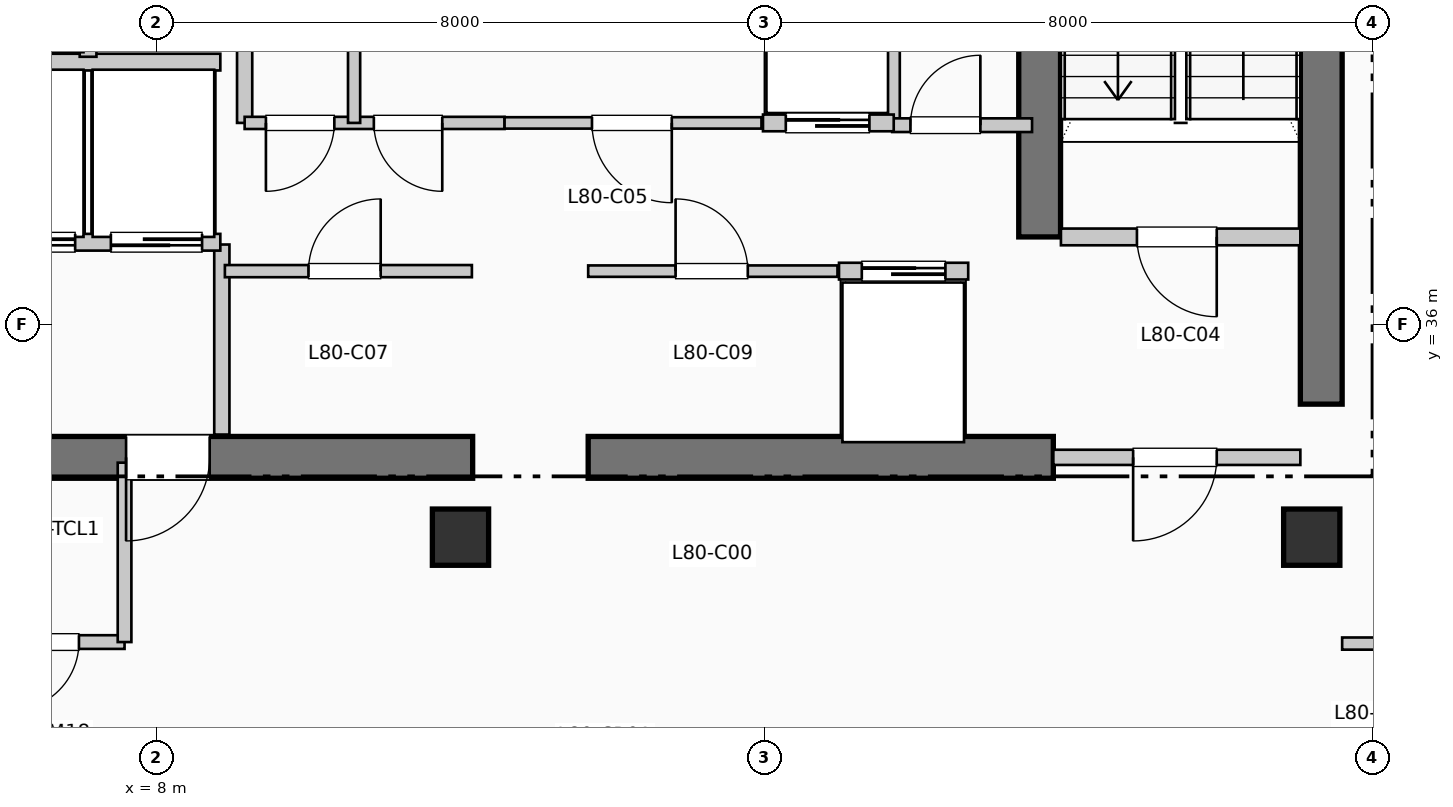
"""IFC4 building model, lengths in metres.
Left out: names, types, materials, properties, quantities, classifications, styles, units other than length and angle.
Written with IfcOpenShell. Run it as: python <this file> out.ifc"""

import sys

from ifc_helpers import new_model, si_unit, direction, frame, frame_2d, origin, origin_2d, place, context, subcontext, project, spatial, rectangle, extrude, element, fill, save


model = new_model("IFC4")
c1 = context("Model", 3, precision=1e-05, world=origin(), true_north=direction((0.0, 1.0)))
c2 = subcontext(c1, "Body", "Model", "MODEL_VIEW")
j1 = project(units=[si_unit("LENGTHUNIT", "METRE"), si_unit("PLANEANGLEUNIT", "RADIAN")], contexts=[c1])
p1 = place(None, origin())
s1 = spatial("IfcSite", under=j1, at=p1, CompositionType="ELEMENT")
p2 = place(p1, origin())
s2 = spatial("IfcBuilding", under=s1, at=p2, CompositionType="ELEMENT")
p3 = place(p2, frame((0.0, 0.0, 327.69)))
s3 = spatial("IfcBuildingStorey", under=s2, at=p3, CompositionType="ELEMENT", Elevation=327.69)
p4 = place(p3, frame((23.325, 34.95, 0.0), z_axis=(0.0, 0.0, 1.0), x_axis=(0.0, 1.0, 0.0)))
e1 = element("IfcWall", 1, at=p4, inside=s3, PredefinedType="SHEAR", context=c2, shape_type="SweptSolid", body=[
    extrude(rectangle(XDim=10.64, YDim=0.55, at=frame_2d((5.32, 0.0))), origin(), (0.0, 0.0, 1.0), 3.96),
])
p5 = place(p3, frame((1.45, 34.25, 0.0), z_axis=(0.0, 0.0, 1.0), x_axis=(1.0, 0.0, 0.0)))
e2 = element("IfcWall", 2, at=p5, inside=s3, PredefinedType="SHEAR", context=c2, shape_type="SweptSolid", body=[
    extrude(rectangle(XDim=10.71, YDim=0.55, at=frame_2d((5.355, 0.0))), origin(), (0.0, 0.0, 1.0), 3.96),
])
p6 = place(p5, frame((7.25, 0.0, 0.0), z_axis=(0.0, 0.0, 1.0), x_axis=(-1.0, 0.0, 0.0)))
e3 = element("IfcOpeningElement", 3, at=p6, cuts=e2, PredefinedType="OPENING", context=c2, shape_type="SweptSolid", body=[
    extrude(rectangle(XDim=1.1, YDim=2.15, at=frame_2d((0.55, 1.075))), frame((0.0, 0.285, 0.0), z_axis=(0.0, -1.0, 0.0), x_axis=(1.0, 0.0, 0.0)), (0.0, 0.0, 1.0), 0.57),
])
p7 = place(p3, frame((13.68, 34.25, 0.0), z_axis=(0.0, 0.0, 1.0), x_axis=(1.0, 0.0, 0.0)))
e4 = element("IfcWall", 4, at=p7, inside=s3, PredefinedType="SHEAR", context=c2, shape_type="SweptSolid", body=[
    extrude(rectangle(XDim=6.12, YDim=0.55, at=frame_2d((3.06, 0.0))), origin(), (0.0, 0.0, 1.0), 3.96),
])
p8 = place(p3, frame((19.62, 37.15, 0.0), z_axis=(0.0, 0.0, 1.0), x_axis=(0.0, 1.0, 0.0)))
e5 = element("IfcWall", 5, at=p8, inside=s3, PredefinedType="SHEAR", context=c2, shape_type="SweptSolid", body=[
    extrude(rectangle(XDim=7.89, YDim=0.55, at=frame_2d((3.945, 0.0))), origin(), (0.0, 0.0, 1.0), 3.96),
])
for number, where, z_axis, x_axis in (
    (6, (12.0, 33.2, 0.0), (0.0, 0.0, 1.0), (1.0, 0.0, 0.0)),
    (7, (23.2, 33.2, 0.0), (0.0, 0.0, 1.0), (1.0, 0.0, 0.0)),
):
    element("IfcColumn", number, at=place(p3, frame(where, z_axis=z_axis, x_axis=x_axis)), inside=s3, PredefinedType="COLUMN", context=c2, shape_type="SweptSolid", body=[
        extrude(rectangle(XDim=0.74, YDim=0.74, at=origin_2d()), origin(), (0.0, 0.0, 1.0), 3.96),
    ])
p9 = place(p3, frame((8.86, 34.55, 0.0), z_axis=(0.0, 0.0, 1.0), x_axis=(0.0, 1.0, 0.0)))
e8 = element("IfcWall", 8, at=p9, inside=s3, PredefinedType="PARTITIONING", context=c2, shape_type="SweptSolid", body=[
    extrude(rectangle(XDim=2.5, YDim=0.2, at=frame_2d((1.25, 0.0))), origin(), (0.0, 0.0, 1.0), 3.74),
])
p10 = place(p3, frame((19.9, 37.15, 0.0), z_axis=(0.0, 0.0, 1.0), x_axis=(1.0, 0.0, 0.0)))
e9 = element("IfcWall", 9, at=p10, inside=s3, PredefinedType="PARTITIONING", context=c2, shape_type="SweptSolid", body=[
    extrude(rectangle(XDim=3.15, YDim=0.22, at=frame_2d((1.575, 0.0))), origin(), (0.0, 0.0, 1.0), 3.74),
])
p11 = place(p10, frame((2.05, 0.0, 0.0), z_axis=(0.0, 0.0, 1.0), x_axis=(-1.0, 0.0, 0.0)))
e10 = element("IfcOpeningElement", 10, at=p11, cuts=e9, PredefinedType="OPENING", context=c2, shape_type="SweptSolid", body=[
    extrude(rectangle(XDim=1.05, YDim=2.15, at=frame_2d((0.525, 1.075))), frame((0.0, 0.12, 0.0), z_axis=(0.0, -1.0, 0.0), x_axis=(1.0, 0.0, 0.0)), (0.0, 0.0, 1.0), 0.24),
])
p12 = place(p3, frame((19.8, 34.25, 0.0), z_axis=(0.0, 0.0, 1.0), x_axis=(1.0, 0.0, 0.0)))
e11 = element("IfcWall", 11, at=p12, inside=s3, PredefinedType="PARTITIONING", context=c2, shape_type="SweptSolid", body=[
    extrude(rectangle(XDim=3.25, YDim=0.2, at=frame_2d((1.625, 0.0))), origin(), (0.0, 0.0, 1.0), 3.74),
])
p13 = place(p12, frame((2.15, 0.0, 0.0), z_axis=(0.0, 0.0, 1.0), x_axis=(-1.0, 0.0, 0.0)))
e12 = element("IfcOpeningElement", 12, at=p13, cuts=e11, PredefinedType="OPENING", context=c2, shape_type="SweptSolid", body=[
    extrude(rectangle(XDim=1.1, YDim=2.15, at=frame_2d((0.55, 1.075))), frame((0.0, 0.11, 0.0), z_axis=(0.0, -1.0, 0.0), x_axis=(1.0, 0.0, 0.0)), (0.0, 0.0, 1.0), 0.22),
])
p14 = place(p3, frame((5.38, 37.08, 0.0), z_axis=(0.0, 0.0, 1.0), x_axis=(1.0, 0.0, 0.0)))
e13 = element("IfcWall", 13, at=p14, inside=s3, PredefinedType="PARTITIONING", context=c2, shape_type="SweptSolid", body=[
    extrude(rectangle(XDim=3.46, YDim=0.22, at=frame_2d((1.73, 0.0))), origin(), (0.0, 0.0, 1.0), 3.74),
])
p15 = place(p14, frame((1.55, 0.0, 0.0), z_axis=(0.0, 0.0, 1.0), x_axis=(-1.0, 0.0, 0.0)))
e14 = element("IfcOpeningElement", 14, at=p15, cuts=e13, PredefinedType="OPENING", context=c2, shape_type="SweptSolid", body=[
    extrude(rectangle(XDim=1.2, YDim=2.2, at=frame_2d((0.6, 1.1))), frame((0.0, 0.12, 0.0), z_axis=(0.0, -1.0, 0.0), x_axis=(1.0, 0.0, 0.0)), (0.0, 0.0, 1.0), 0.24),
])
p16 = place(p14, frame((3.22, 0.0, 0.0), z_axis=(0.0, 0.0, 1.0), x_axis=(-1.0, 0.0, 0.0)))
e15 = element("IfcOpeningElement", 15, at=p16, cuts=e13, PredefinedType="OPENING", context=c2, shape_type="SweptSolid", body=[
    extrude(rectangle(XDim=1.2, YDim=2.2, at=frame_2d((0.6, 1.1))), frame((0.0, 0.12, 0.0), z_axis=(0.0, -1.0, 0.0), x_axis=(1.0, 0.0, 0.0)), (0.0, 0.0, 1.0), 0.24),
])
p17 = place(p3, frame((5.38, 39.45, 0.0), z_axis=(0.0, 0.0, 1.0), x_axis=(1.0, 0.0, 0.0)))
e16 = element("IfcWall", 16, at=p17, inside=s3, PredefinedType="PARTITIONING", context=c2, shape_type="SweptSolid", body=[
    extrude(rectangle(XDim=3.46, YDim=0.22, at=frame_2d((1.73, 0.0))), origin(), (0.0, 0.0, 1.0), 3.74),
])
p18 = place(p3, frame((7.1, 39.52, 0.0), z_axis=(0.0, 0.0, 1.0), x_axis=(0.0, 1.0, 0.0)))
e17 = element("IfcWall", 17, at=p18, inside=s3, PredefinedType="PARTITIONING", context=c2, shape_type="SweptSolid", body=[
    extrude(rectangle(XDim=2.93, YDim=0.22, at=frame_2d((1.465, 0.0))), origin(), (0.0, 0.0, 1.0), 3.74),
])
p19 = place(p18, frame((0.85, 0.0, 0.0)))
e18 = element("IfcOpeningElement", 18, at=p19, cuts=e17, PredefinedType="OPENING", context=c2, shape_type="SweptSolid", body=[
    extrude(rectangle(XDim=1.1, YDim=2.2, at=frame_2d((0.55, 1.1))), frame((0.0, 0.12, 0.0), z_axis=(0.0, -1.0, 0.0), x_axis=(1.0, 0.0, 0.0)), (0.0, 0.0, 1.0), 0.24),
])
for number, where, z_axis, x_axis in (
    (19, (9.16, 38.65, 0.0), (0.0, 0.0, 1.0), (0.0, 1.0, 0.0)),
    (20, (17.68, 38.65, 0.0), (0.0, 0.0, 1.0), (0.0, 1.0, 0.0)),
):
    element("IfcWall", number, at=place(p3, frame(where, z_axis=z_axis, x_axis=x_axis)), inside=s3, PredefinedType="PARTITIONING", context=c2, shape_type="SweptSolid", body=[
        extrude(rectangle(XDim=2.35, YDim=0.2, at=frame_2d((1.175, 0.0))), origin(), (0.0, 0.0, 1.0), 3.74),
    ])
p20 = place(p3, frame((17.68, 38.62, 0.0), z_axis=(0.0, 0.0, 1.0), x_axis=(1.0, 0.0, 0.0)))
e21 = element("IfcWall", 21, at=p20, inside=s3, PredefinedType="PARTITIONING", context=c2, shape_type="SweptSolid", body=[
    extrude(rectangle(XDim=1.84, YDim=0.18, at=frame_2d((0.92, 0.0))), origin(), (0.0, 0.0, 1.0), 3.74),
])
p21 = place(p20, frame((0.24, 0.0, 0.0)))
e22 = element("IfcOpeningElement", 22, at=p21, cuts=e21, PredefinedType="OPENING", context=c2, shape_type="SweptSolid", body=[
    extrude(rectangle(XDim=0.92, YDim=2.1, at=frame_2d((0.46, 1.05))), frame((0.0, 0.1, 0.0), z_axis=(0.0, -1.0, 0.0), x_axis=(1.0, 0.0, 0.0)), (0.0, 0.0, 1.0), 0.2),
])
p22 = place(p3, frame((5.5, 31.82, 0.0), z_axis=(0.0, 0.0, 1.0), x_axis=(1.0, 0.0, 0.0)))
e23 = element("IfcWall", 23, at=p22, inside=s3, PredefinedType="PLUMBINGWALL", context=c2, shape_type="SweptSolid", body=[
    extrude(rectangle(XDim=2.08, YDim=0.18, at=frame_2d((1.04, 0.0))), origin(), (0.0, 0.0, 1.0), 3.74),
])
p23 = place(p22, frame((1.48, 0.0, 0.0), z_axis=(0.0, 0.0, 1.0), x_axis=(-1.0, 0.0, 0.0)))
e24 = element("IfcOpeningElement", 24, at=p23, cuts=e23, PredefinedType="OPENING", context=c2, shape_type="SweptSolid", body=[
    extrude(rectangle(XDim=0.9, YDim=2.1, at=frame_2d((0.45, 1.05))), frame((0.0, 0.1, 0.0), z_axis=(0.0, -1.0, 0.0), x_axis=(1.0, 0.0, 0.0)), (0.0, 0.0, 1.0), 0.2),
])
p24 = place(p3, frame((7.58, 31.82, 0.0), z_axis=(0.0, 0.0, 1.0), x_axis=(0.0, 1.0, 0.0)))
e25 = element("IfcWall", 25, at=p24, inside=s3, PredefinedType="PLUMBINGWALL", context=c2, shape_type="SweptSolid", body=[
    extrude(rectangle(XDim=2.36, YDim=0.18, at=frame_2d((1.18, 0.0))), origin(), (0.0, 0.0, 1.0), 3.74),
])
p25 = place(p3, frame((8.9, 36.7, 0.0), z_axis=(0.0, 0.0, 1.0), x_axis=(1.0, 0.0, 0.0)))
e26 = element("IfcWall", 26, at=p25, inside=s3, PredefinedType="PARTITIONING", context=c2, shape_type="SweptSolid", body=[
    extrude(rectangle(XDim=3.25, YDim=0.16, at=frame_2d((1.625, 0.0))), origin(), (0.0, 0.0, 1.0), 3.74),
])
p26 = place(p25, frame((1.1, 0.0, 0.0)))
e27 = element("IfcOpeningElement", 27, at=p26, cuts=e26, PredefinedType="OPENING", context=c2, shape_type="SweptSolid", body=[
    extrude(rectangle(XDim=0.95, YDim=2.15, at=frame_2d((0.475, 1.075))), frame((0.0, 0.09, 0.0), z_axis=(0.0, -1.0, 0.0), x_axis=(1.0, 0.0, 0.0)), (0.0, 0.0, 1.0), 0.18),
])
p27 = place(p3, frame((9.16, 38.65, 0.0), z_axis=(0.0, 0.0, 1.0), x_axis=(1.0, 0.0, 0.0)))
e28 = element("IfcWall", 28, at=p27, inside=s3, PredefinedType="PARTITIONING", context=c2, shape_type="SweptSolid", body=[
    extrude(rectangle(XDim=3.42, YDim=0.16, at=frame_2d((1.71, 0.0))), origin(), (0.0, 0.0, 1.0), 3.74),
])
p28 = place(p27, frame((1.18, 0.0, 0.0), z_axis=(0.0, 0.0, 1.0), x_axis=(-1.0, 0.0, 0.0)))
e29 = element("IfcOpeningElement", 29, at=p28, cuts=e28, PredefinedType="OPENING", context=c2, shape_type="SweptSolid", body=[
    extrude(rectangle(XDim=0.9, YDim=2.15, at=frame_2d((0.45, 1.075))), frame((0.0, 0.09, 0.0), z_axis=(0.0, -1.0, 0.0), x_axis=(1.0, 0.0, 0.0)), (0.0, 0.0, 1.0), 0.18),
])
p29 = place(p27, frame((2.6, 0.0, 0.0), z_axis=(0.0, 0.0, 1.0), x_axis=(-1.0, 0.0, 0.0)))
e30 = element("IfcOpeningElement", 30, at=p29, cuts=e28, PredefinedType="OPENING", context=c2, shape_type="SweptSolid", body=[
    extrude(rectangle(XDim=0.9, YDim=2.15, at=frame_2d((0.45, 1.075))), frame((0.0, 0.09, 0.0), z_axis=(0.0, -1.0, 0.0), x_axis=(1.0, 0.0, 0.0)), (0.0, 0.0, 1.0), 0.18),
])
p30 = place(p3, frame((10.6, 38.65, 0.0), z_axis=(0.0, 0.0, 1.0), x_axis=(0.0, 1.0, 0.0)))
e31 = element("IfcWall", 31, at=p30, inside=s3, PredefinedType="PARTITIONING", context=c2, shape_type="SweptSolid", body=[
    extrude(rectangle(XDim=2.35, YDim=0.16, at=frame_2d((1.175, 0.0))), origin(), (0.0, 0.0, 1.0), 3.74),
])
p31 = place(p3, frame((13.68, 36.7, 0.0), z_axis=(0.0, 0.0, 1.0), x_axis=(1.0, 0.0, 0.0)))
e32 = element("IfcWall", 32, at=p31, inside=s3, PredefinedType="PARTITIONING", context=c2, shape_type="SweptSolid", body=[
    extrude(rectangle(XDim=3.28, YDim=0.15, at=frame_2d((1.64, 0.0))), origin(), (0.0, 0.0, 1.0), 3.74),
])
p32 = place(p31, frame((1.15, 0.0, 0.0)))
e33 = element("IfcOpeningElement", 33, at=p32, cuts=e32, PredefinedType="OPENING", context=c2, shape_type="SweptSolid", body=[
    extrude(rectangle(XDim=0.95, YDim=2.15, at=frame_2d((0.475, 1.075))), frame((0.0, 0.085, 0.0), z_axis=(0.0, -1.0, 0.0), x_axis=(1.0, 0.0, 0.0)), (0.0, 0.0, 1.0), 0.17),
])
p33 = place(p3, frame((12.58, 38.65, 0.0), z_axis=(0.0, 0.0, 1.0), x_axis=(1.0, 0.0, 0.0)))
e34 = element("IfcWall", 34, at=p33, inside=s3, PredefinedType="PARTITIONING", context=c2, shape_type="SweptSolid", body=[
    extrude(rectangle(XDim=3.38, YDim=0.15, at=frame_2d((1.69, 0.0))), origin(), (0.0, 0.0, 1.0), 3.74),
])
p34 = place(p33, frame((2.2, 0.0, 0.0), z_axis=(0.0, 0.0, 1.0), x_axis=(-1.0, 0.0, 0.0)))
e35 = element("IfcOpeningElement", 35, at=p34, cuts=e34, PredefinedType="OPENING", context=c2, shape_type="SweptSolid", body=[
    extrude(rectangle(XDim=1.05, YDim=2.15, at=frame_2d((0.525, 1.075))), frame((0.0, 0.085, 0.0), z_axis=(0.0, -1.0, 0.0), x_axis=(1.0, 0.0, 0.0)), (0.0, 0.0, 1.0), 0.17),
])
p35 = place(p3, frame((16.98, 36.7, 0.0), z_axis=(0.0, 0.0, 1.0), x_axis=(1.0, 0.0, 0.0)))
e36 = element("IfcWall", 36, at=p35, inside=s3, PredefinedType="PARTITIONING", context=c2, shape_type="SweptSolid", body=[
    extrude(rectangle(XDim=1.7, YDim=0.22, at=frame_2d((0.85, 0.0))), origin(), (0.0, 0.0, 1.0), 3.74),
])
p36 = place(p35, frame((0.3, 0.0, 0.0)))
e37 = element("IfcOpeningElement", 37, at=p36, cuts=e36, PredefinedType="OPENING", context=c2, shape_type="SweptSolid", body=[
    extrude(rectangle(XDim=1.1, YDim=2.2, at=frame_2d((0.55, 1.1))), frame((0.0, 0.12, 0.0), z_axis=(0.0, -1.0, 0.0), x_axis=(1.0, 0.0, 0.0)), (0.0, 0.0, 1.0), 0.24),
])
p37 = place(p3, frame((15.98, 38.65, 0.0), z_axis=(0.0, 0.0, 1.0), x_axis=(1.0, 0.0, 0.0)))
e38 = element("IfcWall", 38, at=p37, inside=s3, PredefinedType="PARTITIONING", context=c2, shape_type="SweptSolid", body=[
    extrude(rectangle(XDim=1.72, YDim=0.22, at=frame_2d((0.86, 0.0))), origin(), (0.0, 0.0, 1.0), 3.74),
])
p38 = place(p37, frame((0.3, 0.0, 0.0)))
e39 = element("IfcOpeningElement", 39, at=p38, cuts=e38, PredefinedType="OPENING", context=c2, shape_type="SweptSolid", body=[
    extrude(rectangle(XDim=1.1, YDim=2.2, at=frame_2d((0.55, 1.1))), frame((0.0, 0.12, 0.0), z_axis=(0.0, -1.0, 0.0), x_axis=(1.0, 0.0, 0.0)), (0.0, 0.0, 1.0), 0.24),
])
p39 = place(p3, frame((23.6, 31.8, 0.0), z_axis=(0.0, 0.0, 1.0), x_axis=(1.0, 0.0, 0.0)))
e40 = element("IfcWall", 40, at=p39, inside=s3, PredefinedType="PARTITIONING", context=c2, shape_type="SweptSolid", body=[
    extrude(rectangle(XDim=4.0, YDim=0.16, at=frame_2d((2.0, 0.0))), origin(), (0.0, 0.0, 1.0), 3.74),
])
p40 = place(p39, frame((1.2, 0.0, 0.0)))
e41 = element("IfcOpeningElement", 41, at=p40, cuts=e40, PredefinedType="OPENING", context=c2, shape_type="SweptSolid", body=[
    extrude(rectangle(XDim=0.95, YDim=2.15, at=frame_2d((0.475, 1.075))), frame((0.0, 0.09, 0.0), z_axis=(0.0, -1.0, 0.0), x_axis=(1.0, 0.0, 0.0)), (0.0, 0.0, 1.0), 0.18),
])
p41 = place(p6, origin())
e42 = element("IfcDoor", 42, at=p41, inside=s3, OperationType="SINGLE_SWING_LEFT", PredefinedType="DOOR", context=c2, shape_type="SweptSolid", body=[
    extrude(rectangle(XDim=1.1, YDim=2.15, at=frame_2d((0.55, 1.075))), frame((0.0, 0.025, 0.0), z_axis=(0.0, -1.0, 0.0), x_axis=(1.0, 0.0, 0.0)), (0.0, 0.0, 1.0), 0.05),
])
fill(e3, e42)
p42 = place(p11, origin())
e43 = element("IfcDoor", 43, at=p42, inside=s3, OperationType="SINGLE_SWING_RIGHT", PredefinedType="DOOR", context=c2, shape_type="SweptSolid", body=[
    extrude(rectangle(XDim=1.05, YDim=2.15, at=frame_2d((0.525, 1.075))), frame((0.0, 0.025, 0.0), z_axis=(0.0, -1.0, 0.0), x_axis=(1.0, 0.0, 0.0)), (0.0, 0.0, 1.0), 0.05),
])
fill(e10, e43)
p43 = place(p13, origin())
e44 = element("IfcDoor", 44, at=p43, inside=s3, OperationType="SINGLE_SWING_LEFT", PredefinedType="DOOR", context=c2, shape_type="SweptSolid", body=[
    extrude(rectangle(XDim=1.1, YDim=2.15, at=frame_2d((0.55, 1.075))), frame((0.0, 0.025, 0.0), z_axis=(0.0, -1.0, 0.0), x_axis=(1.0, 0.0, 0.0)), (0.0, 0.0, 1.0), 0.05),
])
fill(e12, e44)
p44 = place(p15, origin())
e45 = element("IfcDoor", 45, at=p44, inside=s3, OperationType="SLIDING_TO_RIGHT", PredefinedType="DOOR", context=c2, shape_type="SweptSolid", body=[
    extrude(rectangle(XDim=1.2, YDim=2.2, at=frame_2d((0.6, 1.1))), frame((0.0, 0.025, 0.0), z_axis=(0.0, -1.0, 0.0), x_axis=(1.0, 0.0, 0.0)), (0.0, 0.0, 1.0), 0.05),
])
fill(e14, e45)
p45 = place(p16, origin())
e46 = element("IfcDoor", 46, at=p45, inside=s3, OperationType="SLIDING_TO_RIGHT", PredefinedType="DOOR", context=c2, shape_type="SweptSolid", body=[
    extrude(rectangle(XDim=1.2, YDim=2.2, at=frame_2d((0.6, 1.1))), frame((0.0, 0.025, 0.0), z_axis=(0.0, -1.0, 0.0), x_axis=(1.0, 0.0, 0.0)), (0.0, 0.0, 1.0), 0.05),
])
fill(e15, e46)
p46 = place(p21, origin())
e47 = element("IfcDoor", 47, at=p46, inside=s3, OperationType="SINGLE_SWING_RIGHT", PredefinedType="DOOR", context=c2, shape_type="SweptSolid", body=[
    extrude(rectangle(XDim=0.92, YDim=2.1, at=frame_2d((0.46, 1.05))), frame((0.0, 0.025, 0.0), z_axis=(0.0, -1.0, 0.0), x_axis=(1.0, 0.0, 0.0)), (0.0, 0.0, 1.0), 0.05),
])
fill(e22, e47)
p47 = place(p23, origin())
e48 = element("IfcDoor", 48, at=p47, inside=s3, OperationType="SINGLE_SWING_LEFT", PredefinedType="DOOR", context=c2, shape_type="SweptSolid", body=[
    extrude(rectangle(XDim=0.9, YDim=2.1, at=frame_2d((0.45, 1.05))), frame((0.0, 0.025, 0.0), z_axis=(0.0, -1.0, 0.0), x_axis=(1.0, 0.0, 0.0)), (0.0, 0.0, 1.0), 0.05),
])
fill(e24, e48)
p48 = place(p26, origin())
e49 = element("IfcDoor", 49, at=p48, inside=s3, OperationType="SINGLE_SWING_RIGHT", PredefinedType="DOOR", context=c2, shape_type="SweptSolid", body=[
    extrude(rectangle(XDim=0.95, YDim=2.15, at=frame_2d((0.475, 1.075))), frame((0.0, 0.025, 0.0), z_axis=(0.0, -1.0, 0.0), x_axis=(1.0, 0.0, 0.0)), (0.0, 0.0, 1.0), 0.05),
])
fill(e27, e49)
p49 = place(p28, origin())
e50 = element("IfcDoor", 50, at=p49, inside=s3, OperationType="SINGLE_SWING_LEFT", PredefinedType="DOOR", context=c2, shape_type="SweptSolid", body=[
    extrude(rectangle(XDim=0.9, YDim=2.15, at=frame_2d((0.45, 1.075))), frame((0.0, 0.025, 0.0), z_axis=(0.0, -1.0, 0.0), x_axis=(1.0, 0.0, 0.0)), (0.0, 0.0, 1.0), 0.05),
])
fill(e29, e50)
p50 = place(p29, origin())
e51 = element("IfcDoor", 51, at=p50, inside=s3, OperationType="SINGLE_SWING_RIGHT", PredefinedType="DOOR", context=c2, shape_type="SweptSolid", body=[
    extrude(rectangle(XDim=0.9, YDim=2.15, at=frame_2d((0.45, 1.075))), frame((0.0, 0.025, 0.0), z_axis=(0.0, -1.0, 0.0), x_axis=(1.0, 0.0, 0.0)), (0.0, 0.0, 1.0), 0.05),
])
fill(e30, e51)
p51 = place(p32, origin())
e52 = element("IfcDoor", 52, at=p51, inside=s3, OperationType="SINGLE_SWING_LEFT", PredefinedType="DOOR", context=c2, shape_type="SweptSolid", body=[
    extrude(rectangle(XDim=0.95, YDim=2.15, at=frame_2d((0.475, 1.075))), frame((0.0, 0.025, 0.0), z_axis=(0.0, -1.0, 0.0), x_axis=(1.0, 0.0, 0.0)), (0.0, 0.0, 1.0), 0.05),
])
fill(e33, e52)
p52 = place(p34, origin())
e53 = element("IfcDoor", 53, at=p52, inside=s3, OperationType="SINGLE_SWING_RIGHT", PredefinedType="DOOR", context=c2, shape_type="SweptSolid", body=[
    extrude(rectangle(XDim=1.05, YDim=2.15, at=frame_2d((0.525, 1.075))), frame((0.0, 0.025, 0.0), z_axis=(0.0, -1.0, 0.0), x_axis=(1.0, 0.0, 0.0)), (0.0, 0.0, 1.0), 0.05),
])
fill(e35, e53)
p53 = place(p36, origin())
e54 = element("IfcDoor", 54, at=p53, inside=s3, OperationType="SLIDING_TO_LEFT", PredefinedType="DOOR", context=c2, shape_type="SweptSolid", body=[
    extrude(rectangle(XDim=1.1, YDim=2.2, at=frame_2d((0.55, 1.1))), frame((0.0, 0.025, 0.0), z_axis=(0.0, -1.0, 0.0), x_axis=(1.0, 0.0, 0.0)), (0.0, 0.0, 1.0), 0.05),
])
fill(e37, e54)
p54 = place(p38, origin())
e55 = element("IfcDoor", 55, at=p54, inside=s3, OperationType="SLIDING_TO_LEFT", PredefinedType="DOOR", context=c2, shape_type="SweptSolid", body=[
    extrude(rectangle(XDim=1.1, YDim=2.2, at=frame_2d((0.55, 1.1))), frame((0.0, 0.025, 0.0), z_axis=(0.0, -1.0, 0.0), x_axis=(1.0, 0.0, 0.0)), (0.0, 0.0, 1.0), 0.05),
])
fill(e39, e55)
save(model, sys.argv[1])
